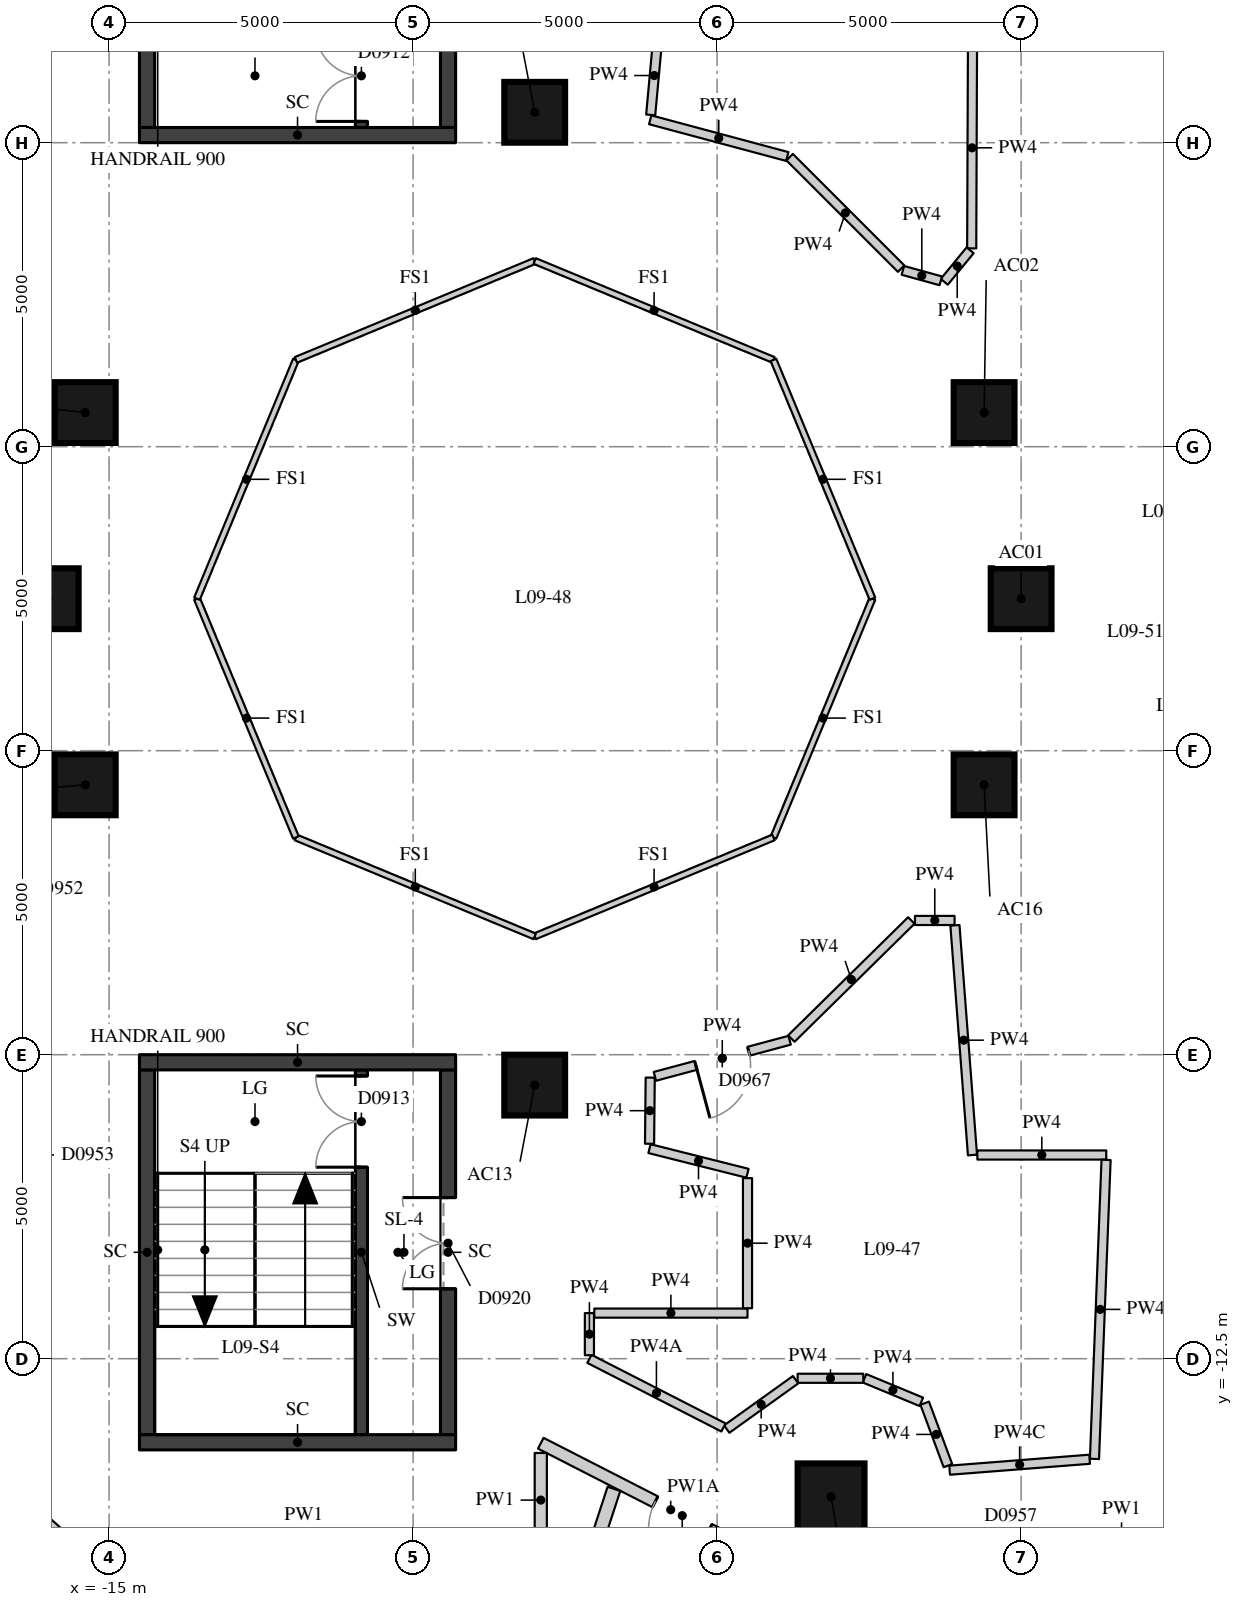
"""IFC4 building model, lengths in metres.
Left out: names, types, materials, properties, quantities, classifications, styles, units other than length and angle.
Written with IfcOpenShell. Run it as: python <this file> out.ifc"""

import sys

from ifc_helpers import new_model, si_unit, direction, frame, frame_2d, origin, origin_2d, place, context, subcontext, project, spatial, rectangle, extrude, element, fill, save


model = new_model("IFC4")
c1 = context("Model", 3, precision=1e-05, world=origin(), true_north=direction((0.0, 1.0)))
c2 = subcontext(c1, "Body", "Model", "MODEL_VIEW")
j1 = project(units=[si_unit("LENGTHUNIT", "METRE"), si_unit("PLANEANGLEUNIT", "RADIAN")], contexts=[c1])
p1 = place(None, origin())
s1 = spatial("IfcSite", under=j1, at=p1, CompositionType="ELEMENT")
p2 = place(p1, origin())
s2 = spatial("IfcBuilding", under=s1, at=p2, CompositionType="ELEMENT")
p3 = place(p2, frame((0.0, 0.0, 38.2)))
s3 = spatial("IfcBuildingStorey", under=s2, at=p3, CompositionType="ELEMENT", Elevation=38.2)
for number, where, z_axis, x_axis in (
    (1, (0.0, 0.0, 0.0), (0.0, 0.0, 1.0), (1.0, 0.0, 0.0)),
    (2, (-0.609, 3.062, 0.0), (0.0, 0.0, 1.0), (1.0, 0.0, 0.0)),
    (3, (-8.0, 8.0, 0.0), (0.0, 0.0, 1.0), (1.0, 0.0, 0.0)),
    (4, (-15.391, 3.062, 0.0), (0.0, 0.0, 1.0), (1.0, 0.0, 0.0)),
    (5, (-16.0, 0.0, 0.0), (0.0, 0.0, 1.0), (1.0, 0.0, 0.0)),
    (6, (-15.391, -3.062, 0.0), (0.0, 0.0, 1.0), (1.0, 0.0, 0.0)),
    (7, (-8.0, -8.0, 0.0), (0.0, 0.0, 1.0), (1.0, 0.0, 0.0)),
    (8, (-0.609, -3.062, 0.0), (0.0, 0.0, 1.0), (1.0, 0.0, 0.0)),
):
    element("IfcColumn", number, at=place(p3, frame(where, z_axis=z_axis, x_axis=x_axis)), inside=s3, PredefinedType="COLUMN", context=c2, shape_type="SweptSolid", body=[
        extrude(rectangle(XDim=1.0, YDim=1.0, at=origin_2d()), origin(), (0.0, 0.0, 1.0), 3.3),
    ])
p4 = place(p3, frame((-3.126, -14.772, 0.0), z_axis=(0.0, 0.0, 1.0), x_axis=(1.0, 0.0, 0.0)))
e9 = element("IfcColumn", 9, at=p4, inside=s3, PredefinedType="COLUMN", context=c2, shape_type="SweptSolid", body=[
    extrude(rectangle(XDim=1.1, YDim=1.1, at=origin_2d()), origin(), (0.0, 0.0, 1.0), 3.3),
])
p5 = place(p3, frame((-10.85, 7.75, 0.0), z_axis=(0.0, 0.0, 1.0), x_axis=(0.0, 1.0, 0.0)))
e10 = element("IfcWall", 10, at=p5, inside=s3, PredefinedType="SHEAR", context=c2, shape_type="SweptSolid", body=[
    extrude(rectangle(XDim=6.0, YDim=0.2, at=frame_2d((3.0, 0.0))), origin(), (0.0, 0.0, 1.0), 3.02),
])
p6 = place(p5, frame((0.1, 0.0, 0.0)))
e11 = element("IfcOpeningElement", 11, at=p6, cuts=e10, PredefinedType="OPENING", context=c2, shape_type="SweptSolid", body=[
    extrude(rectangle(XDim=1.5, YDim=2.1, at=frame_2d((0.75, 1.05))), frame((0.0, 0.11, 0.0), z_axis=(0.0, -1.0, 0.0), x_axis=(1.0, 0.0, 0.0)), (0.0, 0.0, 1.0), 0.22),
])
p7 = place(p3, frame((-10.85, -13.75, 0.0), z_axis=(0.0, 0.0, 1.0), x_axis=(0.0, 1.0, 0.0)))
e12 = element("IfcWall", 12, at=p7, inside=s3, PredefinedType="SHEAR", context=c2, shape_type="SweptSolid", body=[
    extrude(rectangle(XDim=6.0, YDim=0.2, at=frame_2d((3.0, 0.0))), origin(), (0.0, 0.0, 1.0), 3.02),
])
p8 = place(p7, frame((4.4, 0.0, 0.0)))
e13 = element("IfcOpeningElement", 13, at=p8, cuts=e12, PredefinedType="OPENING", context=c2, shape_type="SweptSolid", body=[
    extrude(rectangle(XDim=1.5, YDim=2.1, at=frame_2d((0.75, 1.05))), frame((0.0, 0.11, 0.0), z_axis=(0.0, -1.0, 0.0), x_axis=(1.0, 0.0, 0.0)), (0.0, 0.0, 1.0), 0.22),
])
p9 = place(p3, frame((-14.375, 7.75, -0.28), z_axis=(0.0, 0.0, 1.0), x_axis=(0.0, 1.0, 0.0)))
e14 = element("IfcWall", 14, at=p9, inside=s3, PredefinedType="SHEAR", context=c2, shape_type="SweptSolid", body=[
    extrude(rectangle(XDim=6.0, YDim=0.25, at=frame_2d((3.0, 0.0))), origin(), (0.0, 0.0, 1.0), 3.3),
])
p10 = place(p3, frame((-9.425, 7.75, -0.28), z_axis=(0.0, 0.0, 1.0), x_axis=(0.0, 1.0, 0.0)))
e15 = element("IfcWall", 15, at=p10, inside=s3, PredefinedType="SHEAR", context=c2, shape_type="SweptSolid", body=[
    extrude(rectangle(XDim=6.0, YDim=0.25, at=frame_2d((3.0, 0.0))), origin(), (0.0, 0.0, 1.0), 3.3),
])
p11 = place(p10, frame((2.1, 0.0, 0.28)))
e16 = element("IfcOpeningElement", 16, at=p11, cuts=e15, PredefinedType="OPENING", context=c2, shape_type="SweptSolid", body=[
    extrude(rectangle(XDim=1.5, YDim=2.1, at=frame_2d((0.75, 1.05))), frame((0.0, 0.135, 0.0), z_axis=(0.0, -1.0, 0.0), x_axis=(1.0, 0.0, 0.0)), (0.0, 0.0, 1.0), 0.27),
])
p12 = place(p3, frame((-14.5, 7.625, -0.28), z_axis=(0.0, 0.0, 1.0), x_axis=(1.0, 0.0, 0.0)))
e17 = element("IfcWall", 17, at=p12, inside=s3, PredefinedType="SHEAR", context=c2, shape_type="SweptSolid", body=[
    extrude(rectangle(XDim=5.2, YDim=0.25, at=frame_2d((2.6, 0.0))), origin(), (0.0, 0.0, 1.0), 3.3),
])
p13 = place(p3, frame((-14.375, -13.75, -0.28), z_axis=(0.0, 0.0, 1.0), x_axis=(0.0, 1.0, 0.0)))
e18 = element("IfcWall", 18, at=p13, inside=s3, PredefinedType="SHEAR", context=c2, shape_type="SweptSolid", body=[
    extrude(rectangle(XDim=6.0, YDim=0.25, at=frame_2d((3.0, 0.0))), origin(), (0.0, 0.0, 1.0), 3.3),
])
p14 = place(p3, frame((-9.425, -13.75, -0.28), z_axis=(0.0, 0.0, 1.0), x_axis=(0.0, 1.0, 0.0)))
e19 = element("IfcWall", 19, at=p14, inside=s3, PredefinedType="SHEAR", context=c2, shape_type="SweptSolid", body=[
    extrude(rectangle(XDim=6.0, YDim=0.25, at=frame_2d((3.0, 0.0))), origin(), (0.0, 0.0, 1.0), 3.3),
])
p15 = place(p14, frame((2.4, 0.0, 0.28)))
e20 = element("IfcOpeningElement", 20, at=p15, cuts=e19, PredefinedType="OPENING", context=c2, shape_type="SweptSolid", body=[
    extrude(rectangle(XDim=1.5, YDim=2.1, at=frame_2d((0.75, 1.05))), frame((0.0, 0.135, 0.0), z_axis=(0.0, -1.0, 0.0), x_axis=(1.0, 0.0, 0.0)), (0.0, 0.0, 1.0), 0.27),
])
for number, where, z_axis, x_axis in (
    (21, (-14.5, -7.625, -0.28), (0.0, 0.0, 1.0), (1.0, 0.0, 0.0)),
    (22, (-14.5, -13.875, -0.28), (0.0, 0.0, 1.0), (1.0, 0.0, 0.0)),
):
    element("IfcWall", number, at=place(p3, frame(where, z_axis=z_axis, x_axis=x_axis)), inside=s3, PredefinedType="SHEAR", context=c2, shape_type="SweptSolid", body=[
        extrude(rectangle(XDim=5.2, YDim=0.25, at=frame_2d((2.6, 0.0))), origin(), (0.0, 0.0, 1.0), 3.3),
    ])
p16 = place(p3, frame((6.84, -15.313, 0.0), z_axis=(0.0, 0.0, 1.0), x_axis=(-0.996968882229, -0.077801335898, 0.0)))
e23 = element("IfcWall", 23, at=p16, inside=s3, PredefinedType="PARTITIONING", context=c2, shape_type="SweptSolid", body=[
    extrude(rectangle(XDim=10.409, YDim=0.2, at=frame_2d((5.204, 0.0))), origin(), (0.0, 0.0, 1.0), 3.02),
])
p17 = place(p16, frame((5.773, 0.0, 0.0)))
e24 = element("IfcOpeningElement", 24, at=p17, cuts=e23, PredefinedType="OPENING", context=c2, shape_type="SweptSolid", body=[
    extrude(rectangle(XDim=1.1, YDim=2.1, at=frame_2d((0.55, 1.05))), frame((0.0, 0.11, 0.0), z_axis=(0.0, -1.0, 0.0), x_axis=(1.0, 0.0, 0.0)), (0.0, 0.0, 1.0), 0.22),
])
p18 = place(p16, frame((1.255, 0.0, 0.0)))
e25 = element("IfcOpeningElement", 25, at=p18, cuts=e23, PredefinedType="OPENING", context=c2, shape_type="SweptSolid", body=[
    extrude(rectangle(XDim=0.9, YDim=2.1, at=frame_2d((0.45, 1.05))), frame((0.0, 0.11, 0.0), z_axis=(0.0, -1.0, 0.0), x_axis=(1.0, 0.0, 0.0)), (0.0, 0.0, 1.0), 0.22),
])
p19 = place(p3, frame((-3.626, -16.078, 0.0), z_axis=(0.0, 0.0, 1.0), x_axis=(-0.890197807844, 0.455574212297, 0.0)))
e26 = element("IfcWall", 26, at=p19, inside=s3, PredefinedType="PARTITIONING", context=c2, shape_type="SweptSolid", body=[
    extrude(rectangle(XDim=4.801, YDim=0.2, at=frame_2d((2.4, 0.0))), origin(), (0.0, 0.0, 1.0), 2.57),
])
p20 = place(p19, frame((1.688, 0.0, 0.0)))
e27 = element("IfcOpeningElement", 27, at=p20, cuts=e26, PredefinedType="OPENING", context=c2, shape_type="SweptSolid", body=[
    extrude(rectangle(XDim=1.0, YDim=2.1, at=frame_2d((0.5, 1.05))), frame((0.0, 0.11, 0.0), z_axis=(0.0, -1.0, 0.0), x_axis=(1.0, 0.0, 0.0)), (0.0, 0.0, 1.0), 0.22),
])
p21 = place(p3, frame((-7.9, -14.051, 0.0), z_axis=(0.0, 0.0, 1.0), x_axis=(0.0, -1.0, 0.0)))
e28 = element("IfcWall", 28, at=p21, inside=s3, PredefinedType="PARTITIONING", context=c2, shape_type="SweptSolid", body=[
    extrude(rectangle(XDim=1.55, YDim=0.2, at=frame_2d((0.775, 0.0))), origin(), (0.0, 0.0, 1.0), 3.02),
])
p22 = place(p3, frame((-15.636, -15.56, 0.0), z_axis=(0.0, 0.0, 1.0), x_axis=(-0.744656758283, 0.667447610187, 0.0)))
e29 = element("IfcWall", 29, at=p22, inside=s3, PredefinedType="PARTITIONING", context=c2, shape_type="SweptSolid", body=[
    extrude(rectangle(XDim=0.623, YDim=0.2, at=frame_2d((0.312, 0.0))), origin(), (0.0, 0.0, 1.0), 3.02),
])
p23 = place(p3, frame((-0.8, 9.07, 0.0), z_axis=(0.0, 0.0, 1.0), x_axis=(-0.003911409193, -0.99999235041, 0.0)))
e30 = element("IfcWall", 30, at=p23, inside=s3, PredefinedType="PARTITIONING", context=c2, shape_type="SweptSolid", body=[
    extrude(rectangle(XDim=3.308, YDim=0.15, at=frame_2d((1.654, 0.0))), origin(), (0.0, 0.0, 1.0), 3.02),
])
p24 = place(p3, frame((-0.838, 5.731, 0.0), z_axis=(0.0, 0.0, 1.0), x_axis=(-0.634227442266, -0.773146526524, 0.0)))
e31 = element("IfcWall", 31, at=p24, inside=s3, PredefinedType="PARTITIONING", context=c2, shape_type="SweptSolid", body=[
    extrude(rectangle(XDim=0.671, YDim=0.15, at=frame_2d((0.336, 0.0))), origin(), (0.0, 0.0, 1.0), 3.02),
])
p25 = place(p3, frame((-1.322, 5.228, 0.0), z_axis=(0.0, 0.0, 1.0), x_axis=(-0.963895729021, 0.266279972163, 0.0)))
e32 = element("IfcWall", 32, at=p25, inside=s3, PredefinedType="PARTITIONING", context=c2, shape_type="SweptSolid", body=[
    extrude(rectangle(XDim=0.646, YDim=0.15, at=frame_2d((0.323, 0.0))), origin(), (0.0, 0.0, 1.0), 3.02),
])
p26 = place(p3, frame((-1.973, 5.428, 0.0), z_axis=(0.0, 0.0, 1.0), x_axis=(-0.707106781187, 0.707106781187, 0.0)))
e33 = element("IfcWall", 33, at=p26, inside=s3, PredefinedType="PARTITIONING", context=c2, shape_type="SweptSolid", body=[
    extrude(rectangle(XDim=2.593, YDim=0.15, at=frame_2d((1.297, 0.0))), origin(), (0.0, 0.0, 1.0), 3.02),
])
p27 = place(p3, frame((-3.846, 7.272, 0.0), z_axis=(0.0, 0.0, 1.0), x_axis=(-0.965906023197, 0.258892939941, 0.0)))
e34 = element("IfcWall", 34, at=p27, inside=s3, PredefinedType="PARTITIONING", context=c2, shape_type="SweptSolid", body=[
    extrude(rectangle(XDim=2.334, YDim=0.15, at=frame_2d((1.167, 0.0))), origin(), (0.0, 0.0, 1.0), 3.02),
])
p28 = place(p3, frame((-6.092, 7.957, 0.0), z_axis=(0.0, 0.0, 1.0), x_axis=(0.091567710563, 0.99579885237, 0.0)))
e35 = element("IfcWall", 35, at=p28, inside=s3, PredefinedType="PARTITIONING", context=c2, shape_type="SweptSolid", body=[
    extrude(rectangle(XDim=1.301, YDim=0.15, at=frame_2d((0.65, 0.0))), origin(), (0.0, 0.0, 1.0), 3.02),
])
p29 = place(p3, frame((-4.5, -9.45, 0.0), z_axis=(0.0, 0.0, 1.0), x_axis=(-0.9698567074, 0.24367594693, 0.0)))
e36 = element("IfcWall", 36, at=p29, inside=s3, PredefinedType="PARTITIONING", context=c2, shape_type="SweptSolid", body=[
    extrude(rectangle(XDim=1.662, YDim=0.15, at=frame_2d((0.831, 0.0))), origin(), (0.0, 0.0, 1.0), 3.02),
])
p30 = place(p3, frame((-6.111, -8.965, 0.0), z_axis=(0.0, 0.0, 1.0), x_axis=(0.010095962879, 0.999949034468, 0.0)))
e37 = element("IfcWall", 37, at=p30, inside=s3, PredefinedType="PARTITIONING", context=c2, shape_type="SweptSolid", body=[
    extrude(rectangle(XDim=1.088, YDim=0.15, at=frame_2d((0.544, 0.0))), origin(), (0.0, 0.0, 1.0), 3.02),
])
p31 = place(p3, frame((-6.023, -7.856, 0.0), z_axis=(0.0, 0.0, 1.0), x_axis=(0.965896736613, 0.258927584859, 0.0)))
e38 = element("IfcWall", 38, at=p31, inside=s3, PredefinedType="PARTITIONING", context=c2, shape_type="SweptSolid", body=[
    extrude(rectangle(XDim=2.294, YDim=0.15, at=frame_2d((1.147, 0.0))), origin(), (0.0, 0.0, 1.0), 3.02),
])
p32 = place(p31, frame((0.697, 0.0, 0.0)))
e39 = element("IfcOpeningElement", 39, at=p32, cuts=e38, PredefinedType="OPENING", context=c2, shape_type="SweptSolid", body=[
    extrude(rectangle(XDim=0.9, YDim=2.1, at=frame_2d((0.45, 1.05))), frame((0.0, 0.085, 0.0), z_axis=(0.0, -1.0, 0.0), x_axis=(1.0, 0.0, 0.0)), (0.0, 0.0, 1.0), 0.17),
])
p33 = place(p3, frame((-3.779, -7.234, 0.0), z_axis=(0.0, 0.0, 1.0), x_axis=(0.712684144815, 0.701485074487, 0.0)))
e40 = element("IfcWall", 40, at=p33, inside=s3, PredefinedType="PARTITIONING", context=c2, shape_type="SweptSolid", body=[
    extrude(rectangle(XDim=2.769, YDim=0.15, at=frame_2d((1.384, 0.0))), origin(), (0.0, 0.0, 1.0), 3.02),
])
p34 = place(p3, frame((-1.746, -5.292, 0.0), z_axis=(0.0, 0.0, 1.0), x_axis=(1.0, 0.0, 0.0)))
e41 = element("IfcWall", 41, at=p34, inside=s3, PredefinedType="PARTITIONING", context=c2, shape_type="SweptSolid", body=[
    extrude(rectangle(XDim=0.651, YDim=0.15, at=frame_2d((0.326, 0.0))), origin(), (0.0, 0.0, 1.0), 3.02),
])
p35 = place(p3, frame((-1.089, -5.372, 0.0), z_axis=(0.0, 0.0, 1.0), x_axis=(0.076169209517, -0.997094905975, 0.0)))
e42 = element("IfcWall", 42, at=p35, inside=s3, PredefinedType="PARTITIONING", context=c2, shape_type="SweptSolid", body=[
    extrude(rectangle(XDim=3.789, YDim=0.15, at=frame_2d((1.894, 0.0))), origin(), (0.0, 0.0, 1.0), 3.02),
])
p36 = place(p3, frame((-0.72, -9.15, 0.0), z_axis=(0.0, 0.0, 1.0), x_axis=(1.0, 0.0, 0.0)))
e43 = element("IfcWall", 43, at=p36, inside=s3, PredefinedType="PARTITIONING", context=c2, shape_type="SweptSolid", body=[
    extrude(rectangle(XDim=2.12, YDim=0.15, at=frame_2d((1.06, 0.0))), origin(), (0.0, 0.0, 1.0), 3.02),
])
p37 = place(p3, frame((1.397, -9.23, 0.0), z_axis=(0.0, 0.0, 1.0), x_axis=(-0.038741742932, -0.99924925687, 0.0)))
e44 = element("IfcWall", 44, at=p37, inside=s3, PredefinedType="PARTITIONING", context=c2, shape_type="SweptSolid", body=[
    extrude(rectangle(XDim=4.922, YDim=0.15, at=frame_2d((2.461, 0.0))), origin(), (0.0, 0.0, 1.0), 3.02),
])
p38 = place(p3, frame((1.126, -14.154, 0.0), z_axis=(0.0, 0.0, 1.0), x_axis=(-0.996959190057, -0.077925434624, 0.0)))
e45 = element("IfcWall", 45, at=p38, inside=s3, PredefinedType="PARTITIONING", context=c2, shape_type="SweptSolid", body=[
    extrude(rectangle(XDim=2.309, YDim=0.15, at=frame_2d((1.155, 0.0))), origin(), (0.0, 0.0, 1.0), 2.42),
])
p39 = place(p3, frame((-1.204, -14.259, 0.0), z_axis=(0.0, 0.0, 1.0), x_axis=(-0.348483202919, 0.937315025636, 0.0)))
e46 = element("IfcWall", 46, at=p39, inside=s3, PredefinedType="PARTITIONING", context=c2, shape_type="SweptSolid", body=[
    extrude(rectangle(XDim=1.095, YDim=0.15, at=frame_2d((0.547, 0.0))), origin(), (0.0, 0.0, 1.0), 3.02),
])
p40 = place(p3, frame((-1.641, -13.209, 0.0), z_axis=(0.0, 0.0, 1.0), x_axis=(-0.923725449546, 0.383055209937, 0.0)))
e47 = element("IfcWall", 47, at=p40, inside=s3, PredefinedType="PARTITIONING", context=c2, shape_type="SweptSolid", body=[
    extrude(rectangle(XDim=1.011, YDim=0.15, at=frame_2d((0.506, 0.0))), origin(), (0.0, 0.0, 1.0), 3.02),
])
p41 = place(p3, frame((-2.596, -12.822, 0.0), z_axis=(0.0, 0.0, 1.0), x_axis=(-1.0, 0.0, 0.0)))
e48 = element("IfcWall", 48, at=p41, inside=s3, PredefinedType="PARTITIONING", context=c2, shape_type="SweptSolid", body=[
    extrude(rectangle(XDim=1.08, YDim=0.15, at=frame_2d((0.54, 0.0))), origin(), (0.0, 0.0, 1.0), 3.02),
])
p42 = place(p3, frame((-3.708, -12.845, 0.0), z_axis=(0.0, 0.0, 1.0), x_axis=(-0.812857190658, -0.58246303539, 0.0)))
e49 = element("IfcWall", 49, at=p42, inside=s3, PredefinedType="PARTITIONING", context=c2, shape_type="SweptSolid", body=[
    extrude(rectangle(XDim=1.395, YDim=0.15, at=frame_2d((0.697, 0.0))), origin(), (0.0, 0.0, 1.0), 3.02),
])
p43 = place(p3, frame((-4.896, -13.631, 0.0), z_axis=(0.0, 0.0, 1.0), x_axis=(-0.890208185307, 0.455553934032, 0.0)))
e50 = element("IfcWall", 50, at=p43, inside=s3, PredefinedType="PARTITIONING", context=c2, shape_type="SweptSolid", body=[
    extrude(rectangle(XDim=2.477, YDim=0.15, at=frame_2d((1.238, 0.0))), origin(), (0.0, 0.0, 1.0), 2.57),
])
p44 = place(p3, frame((-7.1, -12.442, 0.0), z_axis=(0.0, 0.0, 1.0), x_axis=(0.0, 1.0, 0.0)))
e51 = element("IfcWall", 51, at=p44, inside=s3, PredefinedType="PARTITIONING", context=c2, shape_type="SweptSolid", body=[
    extrude(rectangle(XDim=0.692, YDim=0.15, at=frame_2d((0.346, 0.0))), origin(), (0.0, 0.0, 1.0), 3.02),
])
p45 = place(p3, frame((-7.02, -11.75, 0.0), z_axis=(0.0, 0.0, 1.0), x_axis=(1.0, 0.0, 0.0)))
e52 = element("IfcWall", 52, at=p45, inside=s3, PredefinedType="PARTITIONING", context=c2, shape_type="SweptSolid", body=[
    extrude(rectangle(XDim=2.52, YDim=0.15, at=frame_2d((1.26, 0.0))), origin(), (0.0, 0.0, 1.0), 3.02),
])
p46 = place(p3, frame((-4.5, -11.67, 0.0), z_axis=(0.0, 0.0, 1.0), x_axis=(0.0, 1.0, 0.0)))
e53 = element("IfcWall", 53, at=p46, inside=s3, PredefinedType="PARTITIONING", context=c2, shape_type="SweptSolid", body=[
    extrude(rectangle(XDim=2.14, YDim=0.15, at=frame_2d((1.07, 0.0))), origin(), (0.0, 0.0, 1.0), 3.02),
])
p47 = place(p3, frame((-9.429, -23.014, 0.0), z_axis=(0.0, 0.0, 1.0), x_axis=(0.310242805557, 0.950657352362, 0.0)))
e54 = element("IfcWall", 54, at=p47, inside=s3, PredefinedType="PARTITIONING", context=c2, shape_type="SweptSolid", body=[
    extrude(rectangle(XDim=8.808, YDim=0.22, at=frame_2d((4.404, 0.0))), origin(), (0.0, 0.0, 1.0), 3.02),
])
for number, where, z_axis, x_axis in (
    (55, (-2.446, 0.0, 0.0), (0.0, 0.0, 1.0), (-0.383, -0.924, 0.0)),
    (56, (-4.073, -3.927, 0.0), (0.0, 0.0, 1.0), (-0.924, -0.383, 0.0)),
    (57, (-8.0, -5.554, 0.0), (0.0, 0.0, 1.0), (-0.924, 0.383, 0.0)),
    (58, (-11.927, -3.927, 0.0), (0.0, 0.0, 1.0), (-0.383, 0.924, 0.0)),
    (59, (-13.554, 0.0, 0.0), (0.0, 0.0, 1.0), (0.383, 0.924, 0.0)),
    (60, (-11.927, 3.927, 0.0), (0.0, 0.0, 1.0), (0.924, 0.383, 0.0)),
    (61, (-8.0, 5.554, 0.0), (0.0, 0.0, 1.0), (0.924, -0.383, 0.0)),
    (62, (-4.073, 3.927, 0.0), (0.0, 0.0, 1.0), (0.383, -0.924, 0.0)),
):
    element("IfcWall", number, at=place(p3, frame(where, z_axis=z_axis, x_axis=x_axis)), inside=s3, PredefinedType="PARTITIONING", context=c2, shape_type="SweptSolid", body=[
        extrude(rectangle(XDim=4.251, YDim=0.1, at=frame_2d((2.125, 0.0))), origin(), (0.0, 0.0, 1.0), 3.02),
    ])
p48 = place(p6, origin())
e63 = element("IfcDoor", 63, at=p48, inside=s3, OperationType="DOUBLE_DOOR_SINGLE_SWING", PredefinedType="DOOR", context=c2, shape_type="SweptSolid", body=[
    extrude(rectangle(XDim=1.5, YDim=2.1, at=frame_2d((0.75, 1.05))), frame((0.0, 0.025, 0.0), z_axis=(0.0, -1.0, 0.0), x_axis=(1.0, 0.0, 0.0)), (0.0, 0.0, 1.0), 0.05),
])
fill(e11, e63)
p49 = place(p8, origin())
e64 = element("IfcDoor", 64, at=p49, inside=s3, OperationType="DOUBLE_DOOR_SINGLE_SWING", PredefinedType="DOOR", context=c2, shape_type="SweptSolid", body=[
    extrude(rectangle(XDim=1.5, YDim=2.1, at=frame_2d((0.75, 1.05))), frame((0.0, 0.025, 0.0), z_axis=(0.0, -1.0, 0.0), x_axis=(1.0, 0.0, 0.0)), (0.0, 0.0, 1.0), 0.05),
])
fill(e13, e64)
p50 = place(p15, origin())
e65 = element("IfcDoor", 65, at=p50, inside=s3, OperationType="DOUBLE_DOOR_SINGLE_SWING", PredefinedType="DOOR", context=c2, shape_type="SweptSolid", body=[
    extrude(rectangle(XDim=1.5, YDim=2.1, at=frame_2d((0.75, 1.05))), frame((0.0, 0.025, 0.0), z_axis=(0.0, -1.0, 0.0), x_axis=(1.0, 0.0, 0.0)), (0.0, 0.0, 1.0), 0.05),
])
fill(e20, e65)
p51 = place(p20, origin())
e66 = element("IfcDoor", 66, at=p51, inside=s3, OperationType="SINGLE_SWING_LEFT", PredefinedType="DOOR", context=c2, shape_type="SweptSolid", body=[
    extrude(rectangle(XDim=1.0, YDim=2.1, at=frame_2d((0.5, 1.05))), frame((0.0, 0.025, 0.0), z_axis=(0.0, -1.0, 0.0), x_axis=(1.0, 0.0, 0.0)), (0.0, 0.0, 1.0), 0.05),
])
fill(e27, e66)
p52 = place(p32, origin())
e67 = element("IfcDoor", 67, at=p52, inside=s3, OperationType="SINGLE_SWING_RIGHT", PredefinedType="DOOR", context=c2, shape_type="SweptSolid", body=[
    extrude(rectangle(XDim=0.9, YDim=2.1, at=frame_2d((0.45, 1.05))), frame((0.0, 0.025, 0.0), z_axis=(0.0, -1.0, 0.0), x_axis=(1.0, 0.0, 0.0)), (0.0, 0.0, 1.0), 0.05),
])
fill(e39, e67)
save(model, sys.argv[1])
